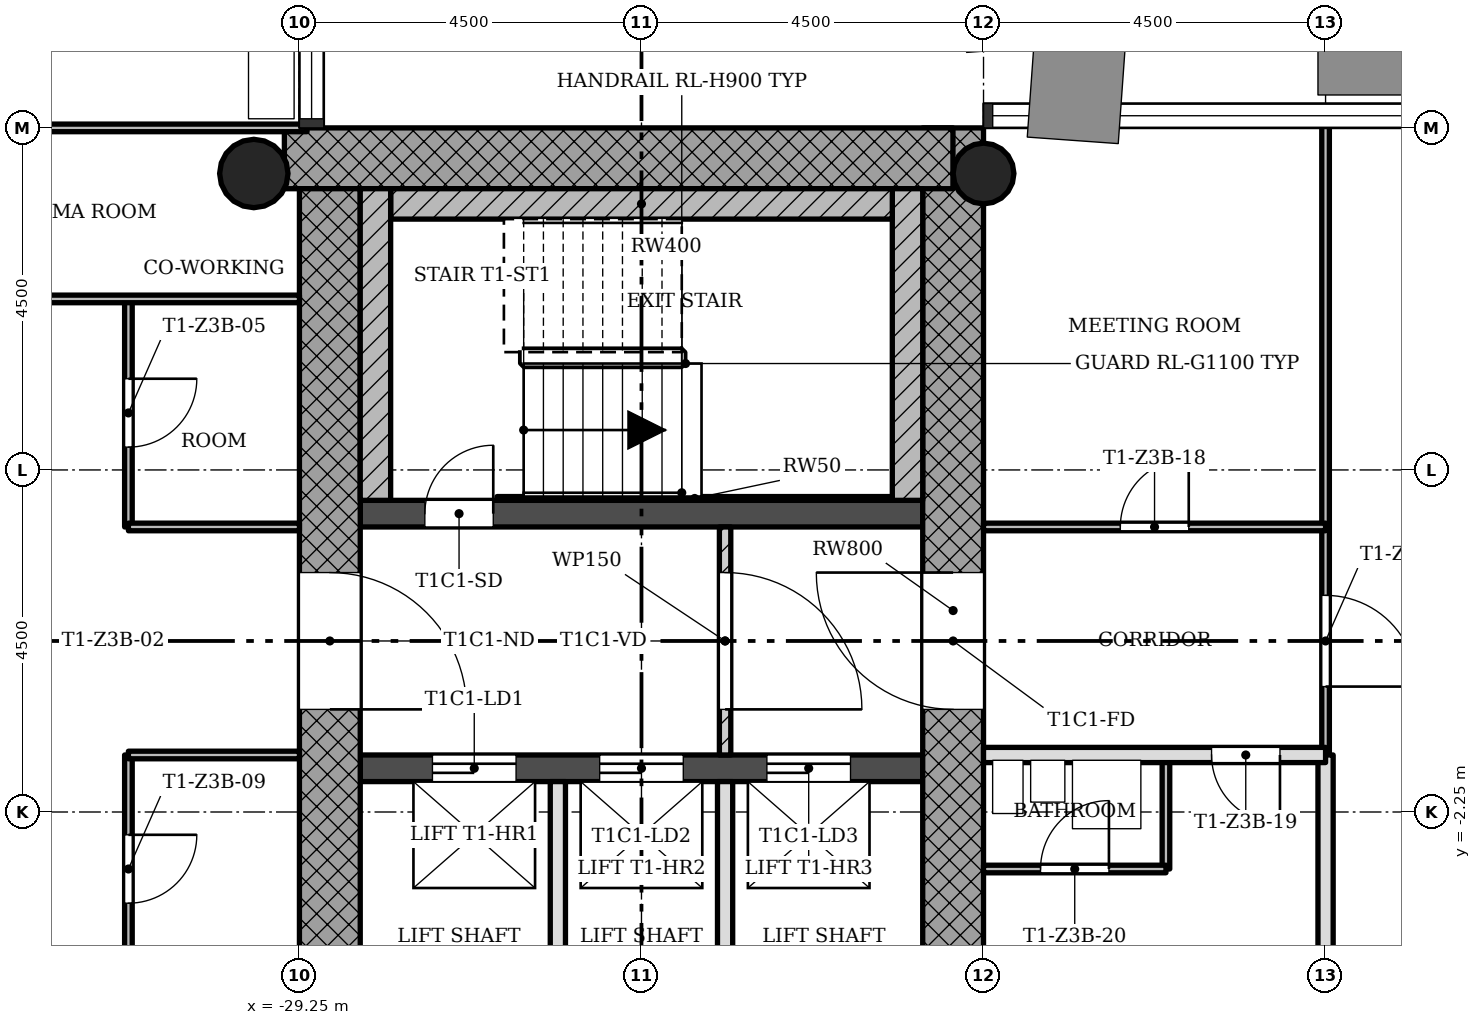
"""IFC4 building model, lengths in metres.
Left out: names, types, materials, properties, quantities, classifications, styles, units other than length and angle.
Written with IfcOpenShell. Run it as: python <this file> out.ifc"""

import sys

from ifc_helpers import new_model, si_unit, direction, frame, frame_2d, origin, origin_2d, place, context, subcontext, project, spatial, rectangle, hollow_circle, extrude, element, fill, save


model = new_model("IFC4")
c1 = context("Model", 3, precision=1e-05, world=origin(), true_north=direction((0.0, 1.0)))
c2 = subcontext(c1, "Body", "Model", "MODEL_VIEW")
j1 = project(units=[si_unit("LENGTHUNIT", "METRE"), si_unit("PLANEANGLEUNIT", "RADIAN")], contexts=[c1])
p1 = place(None, origin())
s1 = spatial("IfcSite", under=j1, at=p1, CompositionType="ELEMENT")
p2 = place(p1, origin())
s2 = spatial("IfcBuilding", under=s1, at=p2, CompositionType="ELEMENT")
p3 = place(p2, frame((0.0, 0.0, 150.7)))
s3 = spatial("IfcBuildingStorey", under=s2, at=p3, CompositionType="ELEMENT", Elevation=150.7)
p4 = place(p3, frame((-20.65, -5.95, 0.0), z_axis=(0.0, 0.0, 1.0), x_axis=(0.0, 1.0, 0.0)))
e1 = element("IfcWall", 1, at=p4, inside=s3, PredefinedType="SHEAR", context=c2, shape_type="SweptSolid", body=[
    extrude(rectangle(XDim=12.7, YDim=0.8, at=frame_2d((6.35, 0.0))), origin(), (0.0, 0.0, 1.0), 3.4),
])
p5 = place(p4, frame((5.05, 0.0, 0.0)))
e2 = element("IfcOpeningElement", 2, at=p5, cuts=e1, PredefinedType="OPENING", context=c2, shape_type="SweptSolid", body=[
    extrude(rectangle(XDim=1.8, YDim=2.1, at=frame_2d((0.9, 1.05))), frame((0.0, 0.41, 0.0), z_axis=(0.0, -1.0, 0.0), x_axis=(1.0, 0.0, 0.0)), (0.0, 0.0, 1.0), 0.82),
])
p6 = place(p3, frame((-20.652, 6.35, 0.0), z_axis=(0.0, 0.0, 1.0), x_axis=(-1.0, 0.0, 0.0)))
e3 = element("IfcWall", 3, at=p6, inside=s3, PredefinedType="SHEAR", context=c2, shape_type="SweptSolid", body=[
    extrude(rectangle(XDim=8.796, YDim=0.8, at=frame_2d((4.398, 0.0))), origin(), (0.0, 0.0, 1.0), 3.4),
])
p7 = place(p3, frame((-28.85, 5.95, 0.0), z_axis=(0.0, 0.0, 1.0), x_axis=(0.0, -1.0, 0.0)))
e4 = element("IfcWall", 4, at=p7, inside=s3, PredefinedType="SHEAR", context=c2, shape_type="SweptSolid", body=[
    extrude(rectangle(XDim=12.7, YDim=0.8, at=frame_2d((6.35, 0.0))), origin(), (0.0, 0.0, 1.0), 3.4),
])
p8 = place(p7, frame((5.05, 0.0, 0.0)))
e5 = element("IfcOpeningElement", 5, at=p8, cuts=e4, PredefinedType="OPENING", context=c2, shape_type="SweptSolid", body=[
    extrude(rectangle(XDim=1.8, YDim=2.1, at=frame_2d((0.9, 1.05))), frame((0.0, 0.41, 0.0), z_axis=(0.0, -1.0, 0.0), x_axis=(1.0, 0.0, 0.0)), (0.0, 0.0, 1.0), 0.82),
])
p9 = place(p3, frame((-28.45, -1.675, 0.0), z_axis=(0.0, 0.0, 1.0), x_axis=(1.0, 0.0, 0.0)))
e6 = element("IfcWall", 6, at=p9, inside=s3, PredefinedType="SHEAR", context=c2, shape_type="SweptSolid", body=[
    extrude(rectangle(XDim=7.4, YDim=0.35, at=frame_2d((3.7, 0.0))), origin(), (0.0, 0.0, 1.0), 3.4),
])
p10 = place(p9, frame((0.95, 0.0, 0.0)))
e7 = element("IfcOpeningElement", 7, at=p10, cuts=e6, PredefinedType="OPENING", context=c2, shape_type="SweptSolid", body=[
    extrude(rectangle(XDim=1.1, YDim=2.1, at=frame_2d((0.55, 1.05))), frame((0.0, 0.185, 0.0), z_axis=(0.0, -1.0, 0.0), x_axis=(1.0, 0.0, 0.0)), (0.0, 0.0, 1.0), 0.37),
])
p11 = place(p9, frame((3.15, 0.0, 0.0)))
e8 = element("IfcOpeningElement", 8, at=p11, cuts=e6, PredefinedType="OPENING", context=c2, shape_type="SweptSolid", body=[
    extrude(rectangle(XDim=1.1, YDim=2.1, at=frame_2d((0.55, 1.05))), frame((0.0, 0.185, 0.0), z_axis=(0.0, -1.0, 0.0), x_axis=(1.0, 0.0, 0.0)), (0.0, 0.0, 1.0), 0.37),
])
p12 = place(p9, frame((5.35, 0.0, 0.0)))
e9 = element("IfcOpeningElement", 9, at=p12, cuts=e6, PredefinedType="OPENING", context=c2, shape_type="SweptSolid", body=[
    extrude(rectangle(XDim=1.1, YDim=2.1, at=frame_2d((0.55, 1.05))), frame((0.0, 0.185, 0.0), z_axis=(0.0, -1.0, 0.0), x_axis=(1.0, 0.0, 0.0)), (0.0, 0.0, 1.0), 0.37),
])
p13 = place(p3, frame((-28.45, 1.675, 0.0), z_axis=(0.0, 0.0, 1.0), x_axis=(1.0, 0.0, 0.0)))
e10 = element("IfcWall", 10, at=p13, inside=s3, PredefinedType="SHEAR", context=c2, shape_type="SweptSolid", body=[
    extrude(rectangle(XDim=7.4, YDim=0.35, at=frame_2d((3.7, 0.0))), origin(), (0.0, 0.0, 1.0), 3.4),
])
p14 = place(p13, frame((0.85, 0.0, 0.0)))
e11 = element("IfcOpeningElement", 11, at=p14, cuts=e10, PredefinedType="OPENING", context=c2, shape_type="SweptSolid", body=[
    extrude(rectangle(XDim=0.9, YDim=2.1, at=frame_2d((0.45, 1.05))), frame((0.0, 0.185, 0.0), z_axis=(0.0, -1.0, 0.0), x_axis=(1.0, 0.0, 0.0)), (0.0, 0.0, 1.0), 0.37),
])
p15 = place(p3, frame((-20.25, 6.15, 0.0), z_axis=(0.0, 0.0, 1.0), x_axis=(1.0, 0.0, 0.0)))
e12 = element("IfcColumn", 12, at=p15, inside=s3, PredefinedType="COLUMN", context=c2, shape_type="SweptSolid", body=[
    extrude(hollow_circle(Radius=0.4, WallThickness=0.028, at=origin_2d()), origin(), (0.0, 0.0, 1.0), 3.4),
])
p16 = place(p3, frame((-29.85, 6.15, 0.0), z_axis=(0.0, 0.0, 1.0), x_axis=(1.0, 0.0, 0.0)))
e13 = element("IfcColumn", 13, at=p16, inside=s3, PredefinedType="COLUMN", context=c2, shape_type="SweptSolid", body=[
    extrude(hollow_circle(Radius=0.45, WallThickness=0.032, at=origin_2d()), origin(), (0.0, 0.0, 1.0), 3.4),
])
p17 = place(p3, frame((-23.65, -1.5, 0.0), z_axis=(0.0, 0.0, 1.0), x_axis=(0.0, 1.0, 0.0)))
e14 = element("IfcWall", 14, at=p17, inside=s3, PredefinedType="PARTITIONING", context=c2, shape_type="SweptSolid", body=[
    extrude(rectangle(XDim=3.0, YDim=0.15, at=frame_2d((1.5, 0.0))), origin(), (0.0, 0.0, 1.0), 3.0),
])
p18 = place(p17, frame((0.6, 0.0, 0.0)))
e15 = element("IfcOpeningElement", 15, at=p18, cuts=e14, PredefinedType="OPENING", context=c2, shape_type="SweptSolid", body=[
    extrude(rectangle(XDim=1.8, YDim=2.1, at=frame_2d((0.9, 1.05))), frame((0.0, 0.085, 0.0), z_axis=(0.0, -1.0, 0.0), x_axis=(1.0, 0.0, 0.0)), (0.0, 0.0, 1.0), 0.17),
])
for number, where, z_axis, x_axis in (
    (16, (-25.85, -5.95, 0.0), (0.0, 0.0, 1.0), (0.0, 1.0, 0.0)),
    (17, (-23.65, -5.95, 0.0), (0.0, 0.0, 1.0), (0.0, 1.0, 0.0)),
):
    element("IfcWall", number, at=place(p3, frame(where, z_axis=z_axis, x_axis=x_axis)), inside=s3, PredefinedType="SOLIDWALL", context=c2, shape_type="SweptSolid", body=[
        extrude(rectangle(XDim=4.1, YDim=0.2, at=frame_2d((2.05, 0.0))), origin(), (0.0, 0.0, 1.0), 3.0),
    ])
p19 = place(p3, frame((-31.5, -6.75, 0.0), z_axis=(0.0, 0.0, 1.0), x_axis=(0.0, 1.0, 0.0)))
e18 = element("IfcWall", 18, at=p19, inside=s3, PredefinedType="PARTITIONING", context=c2, shape_type="SweptSolid", body=[
    extrude(rectangle(XDim=5.25, YDim=0.1, at=frame_2d((2.625, 0.0))), origin(), (0.0, 0.0, 1.0), 3.0),
])
p20 = place(p19, frame((3.3, 0.0, 0.0)))
e19 = element("IfcOpeningElement", 19, at=p20, cuts=e18, PredefinedType="OPENING", context=c2, shape_type="SweptSolid", body=[
    extrude(rectangle(XDim=0.9, YDim=2.1, at=frame_2d((0.45, 1.05))), frame((0.0, 0.06, 0.0), z_axis=(0.0, -1.0, 0.0), x_axis=(1.0, 0.0, 0.0)), (0.0, 0.0, 1.0), 0.12),
])
p21 = place(p3, frame((-31.5, 1.5, 0.0), z_axis=(0.0, 0.0, 1.0), x_axis=(0.0, 1.0, 0.0)))
e20 = element("IfcWall", 20, at=p21, inside=s3, PredefinedType="PARTITIONING", context=c2, shape_type="SweptSolid", body=[
    extrude(rectangle(XDim=3.0, YDim=0.1, at=frame_2d((1.5, 0.0))), origin(), (0.0, 0.0, 1.0), 3.0),
])
p22 = place(p21, frame((1.05, 0.0, 0.0)))
e21 = element("IfcOpeningElement", 21, at=p22, cuts=e20, PredefinedType="OPENING", context=c2, shape_type="SweptSolid", body=[
    extrude(rectangle(XDim=0.9, YDim=2.1, at=frame_2d((0.45, 1.05))), frame((0.0, 0.06, 0.0), z_axis=(0.0, -1.0, 0.0), x_axis=(1.0, 0.0, 0.0)), (0.0, 0.0, 1.0), 0.12),
])
p23 = place(p3, frame((-17.85, -3.0, 0.0), z_axis=(0.0, 0.0, 1.0), x_axis=(0.0, 1.0, 0.0)))
e22 = element("IfcWall", 22, at=p23, inside=s3, PredefinedType="PARTITIONING", context=c2, shape_type="SweptSolid", body=[
    extrude(rectangle(XDim=1.5, YDim=0.1, at=frame_2d((0.75, 0.0))), origin(), (0.0, 0.0, 1.0), 3.0),
])
p24 = place(p3, frame((-15.75, -1.5, 0.0), z_axis=(0.0, 0.0, 1.0), x_axis=(0.0, 1.0, 0.0)))
e23 = element("IfcWall", 23, at=p24, inside=s3, PredefinedType="PARTITIONING", context=c2, shape_type="SweptSolid", body=[
    extrude(rectangle(XDim=8.35, YDim=0.1, at=frame_2d((4.175, 0.0))), origin(), (0.0, 0.0, 1.0), 3.0),
])
p25 = place(p24, frame((0.9, 0.0, 0.0)))
e24 = element("IfcOpeningElement", 24, at=p25, cuts=e23, PredefinedType="OPENING", context=c2, shape_type="SweptSolid", body=[
    extrude(rectangle(XDim=1.2, YDim=2.1, at=frame_2d((0.6, 1.05))), frame((0.0, 0.06, 0.0), z_axis=(0.0, -1.0, 0.0), x_axis=(1.0, 0.0, 0.0)), (0.0, 0.0, 1.0), 0.12),
])
p26 = place(p3, frame((-15.75, -6.85, 0.0), z_axis=(0.0, 0.0, 1.0), x_axis=(0.0, 1.0, 0.0)))
e25 = element("IfcWall", 25, at=p26, inside=s3, PredefinedType="SOLIDWALL", context=c2, shape_type="SweptSolid", body=[
    extrude(rectangle(XDim=5.35, YDim=0.2, at=frame_2d((2.675, 0.0))), origin(), (0.0, 0.0, 1.0), 3.0),
])
p27 = place(p3, frame((-20.25, -3.0, 0.0), z_axis=(0.0, 0.0, 1.0), x_axis=(1.0, 0.0, 0.0)))
e26 = element("IfcWall", 26, at=p27, inside=s3, PredefinedType="PARTITIONING", context=c2, shape_type="SweptSolid", body=[
    extrude(rectangle(XDim=2.4, YDim=0.1, at=frame_2d((1.2, 0.0))), origin(), (0.0, 0.0, 1.0), 3.0),
])
p28 = place(p27, frame((0.75, 0.0, 0.0)))
e27 = element("IfcOpeningElement", 27, at=p28, cuts=e26, PredefinedType="OPENING", context=c2, shape_type="SweptSolid", body=[
    extrude(rectangle(XDim=0.9, YDim=2.1, at=frame_2d((0.45, 1.05))), frame((0.0, 0.06, 0.0), z_axis=(0.0, -1.0, 0.0), x_axis=(1.0, 0.0, 0.0)), (0.0, 0.0, 1.0), 0.12),
])
p29 = place(p3, frame((-31.5, -1.5, 0.0), z_axis=(0.0, 0.0, 1.0), x_axis=(1.0, 0.0, 0.0)))
e28 = element("IfcWall", 28, at=p29, inside=s3, PredefinedType="PARTITIONING", context=c2, shape_type="SweptSolid", body=[
    extrude(rectangle(XDim=2.25, YDim=0.1, at=frame_2d((1.125, 0.0))), origin(), (0.0, 0.0, 1.0), 3.0),
])
p30 = place(p3, frame((-20.25, -1.5, 0.0), z_axis=(0.0, 0.0, 1.0), x_axis=(1.0, 0.0, 0.0)))
e29 = element("IfcWall", 29, at=p30, inside=s3, PredefinedType="SOLIDWALL", context=c2, shape_type="SweptSolid", body=[
    extrude(rectangle(XDim=4.5, YDim=0.2, at=frame_2d((2.25, 0.0))), origin(), (0.0, 0.0, 1.0), 3.0),
])
p31 = place(p30, frame((3.0, 0.0, 0.0)))
e30 = element("IfcOpeningElement", 30, at=p31, cuts=e29, PredefinedType="OPENING", context=c2, shape_type="SweptSolid", body=[
    extrude(rectangle(XDim=0.9, YDim=2.1, at=frame_2d((0.45, 1.05))), frame((0.0, 0.11, 0.0), z_axis=(0.0, -1.0, 0.0), x_axis=(1.0, 0.0, 0.0)), (0.0, 0.0, 1.0), 0.22),
])
p32 = place(p3, frame((-31.5, 1.5, 0.0), z_axis=(0.0, 0.0, 1.0), x_axis=(1.0, 0.0, 0.0)))
e31 = element("IfcWall", 31, at=p32, inside=s3, PredefinedType="PARTITIONING", context=c2, shape_type="SweptSolid", body=[
    extrude(rectangle(XDim=2.25, YDim=0.1, at=frame_2d((1.125, 0.0))), origin(), (0.0, 0.0, 1.0), 3.0),
])
p33 = place(p3, frame((-20.25, 1.5, 0.0), z_axis=(0.0, 0.0, 1.0), x_axis=(1.0, 0.0, 0.0)))
e32 = element("IfcWall", 32, at=p33, inside=s3, PredefinedType="PARTITIONING", context=c2, shape_type="SweptSolid", body=[
    extrude(rectangle(XDim=4.5, YDim=0.1, at=frame_2d((2.25, 0.0))), origin(), (0.0, 0.0, 1.0), 3.0),
])
p34 = place(p33, frame((1.8, 0.0, 0.0)))
e33 = element("IfcOpeningElement", 33, at=p34, cuts=e32, PredefinedType="OPENING", context=c2, shape_type="SweptSolid", body=[
    extrude(rectangle(XDim=0.9, YDim=2.1, at=frame_2d((0.45, 1.05))), frame((0.0, 0.06, 0.0), z_axis=(0.0, -1.0, 0.0), x_axis=(1.0, 0.0, 0.0)), (0.0, 0.0, 1.0), 0.12),
])
p35 = place(p3, frame((-35.1, 4.5, 0.0), z_axis=(0.0, 0.0, 1.0), x_axis=(1.0, 0.0, 0.0)))
e34 = element("IfcWall", 34, at=p35, inside=s3, PredefinedType="PARTITIONING", context=c2, shape_type="SweptSolid", body=[
    extrude(rectangle(XDim=5.85, YDim=0.1, at=frame_2d((2.925, 0.0))), origin(), (0.0, 0.0, 1.0), 3.0),
])
p36 = place(p35, frame((1.35, 0.0, 0.0)))
e35 = element("IfcOpeningElement", 35, at=p36, cuts=e34, PredefinedType="OPENING", context=c2, shape_type="SweptSolid", body=[
    extrude(rectangle(XDim=0.9, YDim=2.1, at=frame_2d((0.45, 1.05))), frame((0.0, 0.06, 0.0), z_axis=(0.0, -1.0, 0.0), x_axis=(1.0, 0.0, 0.0)), (0.0, 0.0, 1.0), 0.12),
])
p37 = place(p3, frame((-35.1, 6.75, 0.0), z_axis=(0.0, 0.0, 1.0), x_axis=(1.0, 0.0, 0.0)))
e36 = element("IfcWall", 36, at=p37, inside=s3, PredefinedType="PARTITIONING", context=c2, shape_type="SweptSolid", body=[
    extrude(rectangle(XDim=5.95, YDim=0.1, at=frame_2d((2.975, 0.0))), origin(), (0.0, 0.0, 1.0), 3.0),
])
p38 = place(p3, frame((-21.25, 1.85, 0.0), z_axis=(0.0, 0.0, 1.0), x_axis=(0.0, 1.0, 0.0)))
e37 = element("IfcWall", 37, at=p38, inside=s3, PredefinedType="SHEAR", context=c2, shape_type="SweptSolid", body=[
    extrude(rectangle(XDim=4.1, YDim=0.4, at=frame_2d((2.05, 0.0))), origin(), (0.0, 0.0, 1.0), 3.4),
])
p39 = place(p3, frame((-28.05, 5.75, 0.0), z_axis=(0.0, 0.0, 1.0), x_axis=(1.0, 0.0, 0.0)))
e38 = element("IfcWall", 38, at=p39, inside=s3, PredefinedType="SHEAR", context=c2, shape_type="SweptSolid", body=[
    extrude(rectangle(XDim=6.6, YDim=0.4, at=frame_2d((3.3, 0.0))), origin(), (0.0, 0.0, 1.0), 3.4),
])
p40 = place(p3, frame((-28.25, 1.85, 0.0), z_axis=(0.0, 0.0, 1.0), x_axis=(0.0, 1.0, 0.0)))
e39 = element("IfcWall", 39, at=p40, inside=s3, PredefinedType="SHEAR", context=c2, shape_type="SweptSolid", body=[
    extrude(rectangle(XDim=4.1, YDim=0.4, at=frame_2d((2.05, 0.0))), origin(), (0.0, 0.0, 1.0), 3.4),
])
p41 = place(p3, frame((-26.65, 1.875, 0.0), z_axis=(0.0, 0.0, 1.0), x_axis=(1.0, 0.0, 0.0)))
e40 = element("IfcWall", 40, at=p41, inside=s3, PredefinedType="SHEAR", context=c2, shape_type="SweptSolid", body=[
    extrude(rectangle(XDim=5.2, YDim=0.05, at=frame_2d((2.6, 0.0))), origin(), (0.0, 0.0, 1.0), 3.4),
])
p42 = place(p18, origin())
e41 = element("IfcDoor", 41, at=p42, inside=s3, OperationType="SINGLE_SWING_LEFT", PredefinedType="DOOR", context=c2, shape_type="SweptSolid", body=[
    extrude(rectangle(XDim=1.8, YDim=2.1, at=frame_2d((0.9, 1.05))), frame((0.0, 0.025, 0.0), z_axis=(0.0, -1.0, 0.0), x_axis=(1.0, 0.0, 0.0)), (0.0, 0.0, 1.0), 0.05),
])
fill(e15, e41)
p43 = place(p22, origin())
e42 = element("IfcDoor", 42, at=p43, inside=s3, OperationType="SINGLE_SWING_RIGHT", PredefinedType="DOOR", context=c2, shape_type="SweptSolid", body=[
    extrude(rectangle(XDim=0.9, YDim=2.1, at=frame_2d((0.45, 1.05))), frame((0.0, 0.025, 0.0), z_axis=(0.0, -1.0, 0.0), x_axis=(1.0, 0.0, 0.0)), (0.0, 0.0, 1.0), 0.05),
])
fill(e21, e42)
p44 = place(p20, origin())
e43 = element("IfcDoor", 43, at=p44, inside=s3, OperationType="SINGLE_SWING_RIGHT", PredefinedType="DOOR", context=c2, shape_type="SweptSolid", body=[
    extrude(rectangle(XDim=0.9, YDim=2.1, at=frame_2d((0.45, 1.05))), frame((0.0, 0.025, 0.0), z_axis=(0.0, -1.0, 0.0), x_axis=(1.0, 0.0, 0.0)), (0.0, 0.0, 1.0), 0.05),
])
fill(e19, e43)
p45 = place(p34, origin())
e44 = element("IfcDoor", 44, at=p45, inside=s3, OperationType="SINGLE_SWING_LEFT", PredefinedType="DOOR", context=c2, shape_type="SweptSolid", body=[
    extrude(rectangle(XDim=0.9, YDim=2.1, at=frame_2d((0.45, 1.05))), frame((0.0, 0.025, 0.0), z_axis=(0.0, -1.0, 0.0), x_axis=(1.0, 0.0, 0.0)), (0.0, 0.0, 1.0), 0.05),
])
fill(e33, e44)
p46 = place(p31, origin())
e45 = element("IfcDoor", 45, at=p46, inside=s3, OperationType="SINGLE_SWING_RIGHT", PredefinedType="DOOR", context=c2, shape_type="SweptSolid", body=[
    extrude(rectangle(XDim=0.9, YDim=2.1, at=frame_2d((0.45, 1.05))), frame((0.0, 0.025, 0.0), z_axis=(0.0, -1.0, 0.0), x_axis=(1.0, 0.0, 0.0)), (0.0, 0.0, 1.0), 0.05),
])
fill(e30, e45)
p47 = place(p28, origin())
e46 = element("IfcDoor", 46, at=p47, inside=s3, OperationType="SINGLE_SWING_LEFT", PredefinedType="DOOR", context=c2, shape_type="SweptSolid", body=[
    extrude(rectangle(XDim=0.9, YDim=2.1, at=frame_2d((0.45, 1.05))), frame((0.0, 0.025, 0.0), z_axis=(0.0, -1.0, 0.0), x_axis=(1.0, 0.0, 0.0)), (0.0, 0.0, 1.0), 0.05),
])
fill(e27, e46)
p48 = place(p25, origin())
e47 = element("IfcDoor", 47, at=p48, inside=s3, OperationType="SINGLE_SWING_LEFT", PredefinedType="DOOR", context=c2, shape_type="SweptSolid", body=[
    extrude(rectangle(XDim=1.2, YDim=2.1, at=frame_2d((0.6, 1.05))), frame((0.0, 0.025, 0.0), z_axis=(0.0, -1.0, 0.0), x_axis=(1.0, 0.0, 0.0)), (0.0, 0.0, 1.0), 0.05),
])
fill(e24, e47)
p49 = place(p14, origin())
e48 = element("IfcDoor", 48, at=p49, inside=s3, OperationType="SINGLE_SWING_LEFT", PredefinedType="DOOR", context=c2, shape_type="SweptSolid", body=[
    extrude(rectangle(XDim=0.9, YDim=2.1, at=frame_2d((0.45, 1.05))), frame((0.0, 0.025, 0.0), z_axis=(0.0, -1.0, 0.0), x_axis=(1.0, 0.0, 0.0)), (0.0, 0.0, 1.0), 0.05),
])
fill(e11, e48)
p50 = place(p10, origin())
e49 = element("IfcDoor", 49, at=p50, inside=s3, OperationType="SLIDING_TO_LEFT", PredefinedType="DOOR", context=c2, shape_type="SweptSolid", body=[
    extrude(rectangle(XDim=1.1, YDim=2.1, at=frame_2d((0.55, 1.05))), frame((0.0, 0.025, 0.0), z_axis=(0.0, -1.0, 0.0), x_axis=(1.0, 0.0, 0.0)), (0.0, 0.0, 1.0), 0.05),
])
fill(e7, e49)
p51 = place(p11, origin())
e50 = element("IfcDoor", 50, at=p51, inside=s3, OperationType="SLIDING_TO_LEFT", PredefinedType="DOOR", context=c2, shape_type="SweptSolid", body=[
    extrude(rectangle(XDim=1.1, YDim=2.1, at=frame_2d((0.55, 1.05))), frame((0.0, 0.025, 0.0), z_axis=(0.0, -1.0, 0.0), x_axis=(1.0, 0.0, 0.0)), (0.0, 0.0, 1.0), 0.05),
])
fill(e8, e50)
p52 = place(p12, origin())
e51 = element("IfcDoor", 51, at=p52, inside=s3, OperationType="SLIDING_TO_LEFT", PredefinedType="DOOR", context=c2, shape_type="SweptSolid", body=[
    extrude(rectangle(XDim=1.1, YDim=2.1, at=frame_2d((0.55, 1.05))), frame((0.0, 0.025, 0.0), z_axis=(0.0, -1.0, 0.0), x_axis=(1.0, 0.0, 0.0)), (0.0, 0.0, 1.0), 0.05),
])
fill(e9, e51)
p53 = place(p8, origin())
e52 = element("IfcDoor", 52, at=p53, inside=s3, OperationType="SINGLE_SWING_LEFT", PredefinedType="DOOR", context=c2, shape_type="SweptSolid", body=[
    extrude(rectangle(XDim=1.8, YDim=2.1, at=frame_2d((0.9, 1.05))), frame((0.0, 0.025, 0.0), z_axis=(0.0, -1.0, 0.0), x_axis=(1.0, 0.0, 0.0)), (0.0, 0.0, 1.0), 0.05),
])
fill(e5, e52)
p54 = place(p5, origin())
e53 = element("IfcDoor", 53, at=p54, inside=s3, OperationType="SINGLE_SWING_LEFT", PredefinedType="DOOR", context=c2, shape_type="SweptSolid", body=[
    extrude(rectangle(XDim=1.8, YDim=2.1, at=frame_2d((0.9, 1.05))), frame((0.0, 0.025, 0.0), z_axis=(0.0, -1.0, 0.0), x_axis=(1.0, 0.0, 0.0)), (0.0, 0.0, 1.0), 0.05),
])
fill(e2, e53)
save(model, sys.argv[1])
